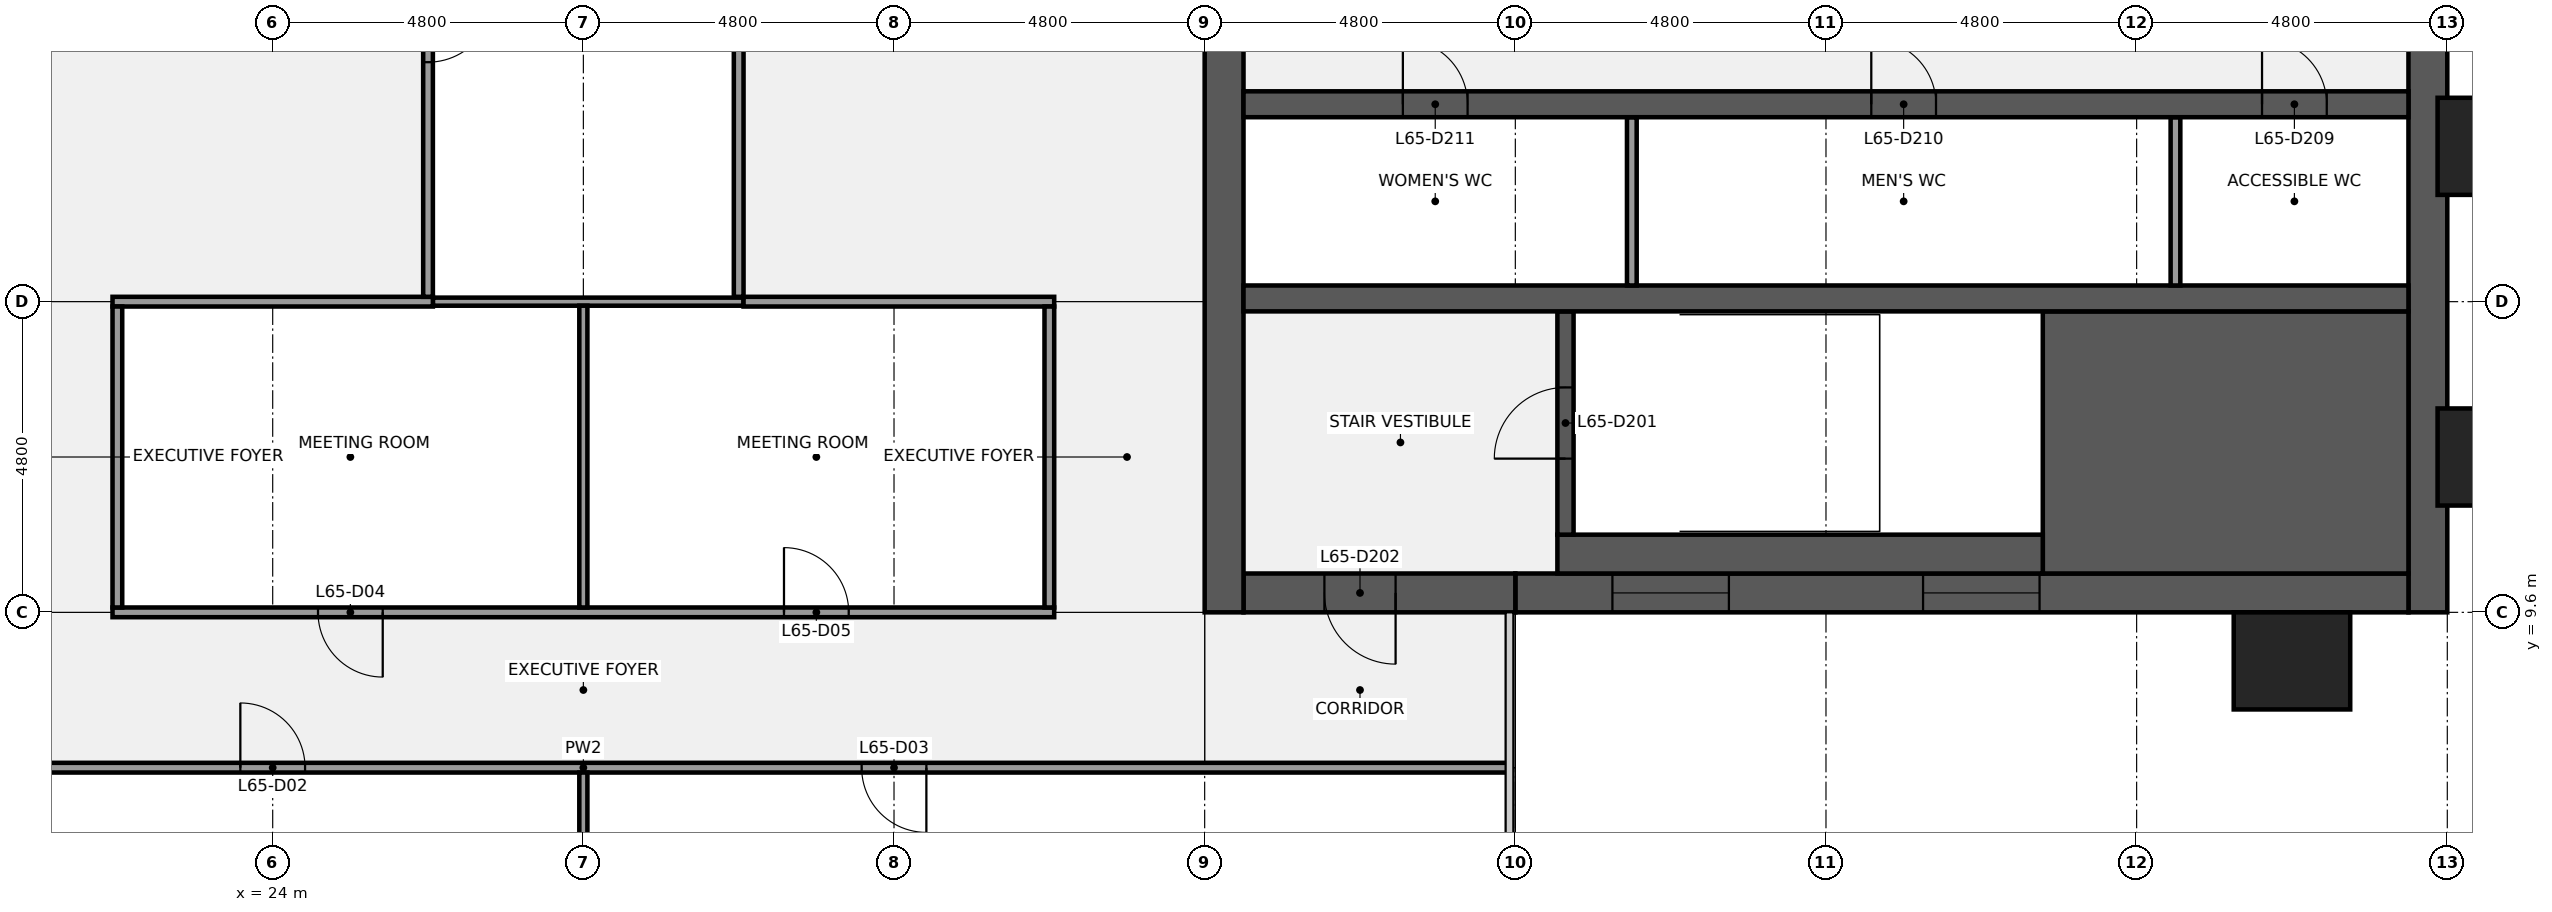
"""IFC4 building model, lengths in metres.
Left out: names, types, materials, properties, quantities, classifications, styles, units other than length and angle.
Written with IfcOpenShell. Run it as: python <this file> out.ifc"""

import sys

from ifc_helpers import new_model, si_unit, direction, frame, frame_2d, origin, origin_2d, place, context, subcontext, project, spatial, rectangle, extrude, element, fill, save


model = new_model("IFC4")
c1 = context("Model", 3, precision=1e-05, world=origin(), true_north=direction((0.0, 1.0)))
c2 = subcontext(c1, "Body", "Model", "MODEL_VIEW")
j1 = project(units=[si_unit("LENGTHUNIT", "METRE"), si_unit("PLANEANGLEUNIT", "RADIAN")], contexts=[c1])
p1 = place(None, origin())
s1 = spatial("IfcSite", under=j1, at=p1, CompositionType="ELEMENT")
p2 = place(p1, origin())
s2 = spatial("IfcBuilding", under=s1, at=p2, CompositionType="ELEMENT")
p3 = place(p2, frame((0.0, 0.0, 298.3)))
s3 = spatial("IfcBuildingStorey", under=s2, at=p3, CompositionType="ELEMENT", Elevation=298.3)
p4 = place(p3, frame((57.3, 38.4, 0.0), z_axis=(0.0, 0.0, 1.0), x_axis=(0.0, -1.0, 0.0)))
e1 = element("IfcWall", 1, at=p4, inside=s3, PredefinedType="SHEAR", context=c2, shape_type="SweptSolid", body=[
    extrude(rectangle(XDim=28.8, YDim=0.6, at=frame_2d((14.4, 0.0))), origin(), (0.0, 0.0, 1.0), 3.84),
])
p5 = place(p4, frame((18.45, 0.0, 0.9)))
e2 = element("IfcOpeningElement", 2, at=p5, cuts=e1, PredefinedType="OPENING", context=c2, shape_type="SweptSolid", body=[
    extrude(rectangle(XDim=1.5, YDim=1.5, at=frame_2d((0.75, 0.75))), frame((0.0, 0.31, 0.0), z_axis=(0.0, -1.0, 0.0), x_axis=(1.0, 0.0, 0.0)), (0.0, 0.0, 1.0), 0.62),
])
p6 = place(p4, frame((8.85, 0.0, 0.9)))
e3 = element("IfcOpeningElement", 3, at=p6, cuts=e1, PredefinedType="OPENING", context=c2, shape_type="SweptSolid", body=[
    extrude(rectangle(XDim=1.5, YDim=1.5, at=frame_2d((0.75, 0.75))), frame((0.0, 0.31, 0.0), z_axis=(0.0, -1.0, 0.0), x_axis=(1.0, 0.0, 0.0)), (0.0, 0.0, 1.0), 0.62),
])
p7 = place(p3, frame((57.0, 9.9, 0.0), z_axis=(0.0, 0.0, 1.0), x_axis=(-1.0, 0.0, 0.0)))
e4 = element("IfcWall", 4, at=p7, inside=s3, PredefinedType="SHEAR", context=c2, shape_type="SweptSolid", body=[
    extrude(rectangle(XDim=13.8, YDim=0.6, at=frame_2d((6.9, 0.0))), origin(), (0.0, 0.0, 1.0), 3.84),
])
p8 = place(p7, frame((5.7, 0.0, 0.9)))
e5 = element("IfcOpeningElement", 5, at=p8, cuts=e4, PredefinedType="OPENING", context=c2, shape_type="SweptSolid", body=[
    extrude(rectangle(XDim=1.8, YDim=1.5, at=frame_2d((0.9, 0.75))), frame((0.0, 0.31, 0.0), z_axis=(0.0, -1.0, 0.0), x_axis=(1.0, 0.0, 0.0)), (0.0, 0.0, 1.0), 0.62),
])
p9 = place(p7, frame((10.5, 0.0, 0.9)))
e6 = element("IfcOpeningElement", 6, at=p9, cuts=e4, PredefinedType="OPENING", context=c2, shape_type="SweptSolid", body=[
    extrude(rectangle(XDim=1.8, YDim=1.5, at=frame_2d((0.9, 0.75))), frame((0.0, 0.31, 0.0), z_axis=(0.0, -1.0, 0.0), x_axis=(1.0, 0.0, 0.0)), (0.0, 0.0, 1.0), 0.62),
])
p10 = place(p3, frame((43.2, 9.9, 0.0), z_axis=(0.0, 0.0, 1.0), x_axis=(-1.0, 0.0, 0.0)))
e7 = element("IfcWall", 7, at=p10, inside=s3, PredefinedType="SHEAR", context=c2, shape_type="SweptSolid", body=[
    extrude(rectangle(XDim=4.2, YDim=0.6, at=frame_2d((2.1, 0.0))), origin(), (0.0, 0.0, 1.0), 3.84),
])
p11 = place(p10, frame((1.85, 0.0, 0.0)))
e8 = element("IfcOpeningElement", 8, at=p11, cuts=e7, PredefinedType="OPENING", context=c2, shape_type="SweptSolid", body=[
    extrude(rectangle(XDim=1.1, YDim=2.1, at=frame_2d((0.55, 1.05))), frame((0.0, 0.31, 0.0), z_axis=(0.0, -1.0, 0.0), x_axis=(1.0, 0.0, 0.0)), (0.0, 0.0, 1.0), 0.62),
])
p12 = place(p3, frame((38.7, 9.6, 0.0), z_axis=(0.0, 0.0, 1.0), x_axis=(0.0, 1.0, 0.0)))
e9 = element("IfcWall", 9, at=p12, inside=s3, PredefinedType="SHEAR", context=c2, shape_type="SweptSolid", body=[
    extrude(rectangle(XDim=28.8, YDim=0.6, at=frame_2d((14.4, 0.0))), origin(), (0.0, 0.0, 1.0), 3.84),
])
p13 = place(p12, frame((8.7, 0.0, 0.0)))
e10 = element("IfcOpeningElement", 10, at=p13, cuts=e9, PredefinedType="OPENING", context=c2, shape_type="SweptSolid", body=[
    extrude(rectangle(XDim=1.8, YDim=2.1, at=frame_2d((0.9, 1.05))), frame((0.0, 0.31, 0.0), z_axis=(0.0, -1.0, 0.0), x_axis=(1.0, 0.0, 0.0)), (0.0, 0.0, 1.0), 0.62),
])
p14 = place(p12, frame((18.3, 0.0, 0.0)))
e11 = element("IfcOpeningElement", 11, at=p14, cuts=e9, PredefinedType="OPENING", context=c2, shape_type="SweptSolid", body=[
    extrude(rectangle(XDim=1.8, YDim=2.1, at=frame_2d((0.9, 1.05))), frame((0.0, 0.31, 0.0), z_axis=(0.0, -1.0, 0.0), x_axis=(1.0, 0.0, 0.0)), (0.0, 0.0, 1.0), 0.62),
])
p15 = place(p3, frame((51.35, 12.225, 0.0), z_axis=(0.0, 0.0, 1.0), x_axis=(1.0, 0.0, 0.0)))
e12 = element("IfcWall", 12, at=p15, inside=s3, PredefinedType="SHEAR", context=c2, shape_type="SweptSolid", body=[
    extrude(rectangle(XDim=5.65, YDim=4.05, at=frame_2d((2.825, 0.0))), origin(), (0.0, 0.0, 1.0), 3.84),
])
p16 = place(p3, frame((43.85, 10.5, 0.0), z_axis=(0.0, 0.0, 1.0), x_axis=(1.0, 0.0, 0.0)))
e13 = element("IfcWall", 13, at=p16, inside=s3, PredefinedType="SHEAR", context=c2, shape_type="SweptSolid", body=[
    extrude(rectangle(XDim=7.5, YDim=0.6, at=frame_2d((3.75, 0.0))), origin(), (0.0, 0.0, 1.0), 3.84),
])
p17 = place(p3, frame((43.975, 10.8, 0.0), z_axis=(0.0, 0.0, 1.0), x_axis=(0.0, 1.0, 0.0)))
e14 = element("IfcWall", 14, at=p17, inside=s3, PredefinedType="SHEAR", context=c2, shape_type="SweptSolid", body=[
    extrude(rectangle(XDim=3.45, YDim=0.25, at=frame_2d((1.725, 0.0))), origin(), (0.0, 0.0, 1.0), 3.84),
])
p18 = place(p17, frame((1.175, 0.0, 0.0)))
e15 = element("IfcOpeningElement", 15, at=p18, cuts=e14, PredefinedType="OPENING", context=c2, shape_type="SweptSolid", body=[
    extrude(rectangle(XDim=1.1, YDim=2.1, at=frame_2d((0.55, 1.05))), frame((0.0, 0.135, 0.0), z_axis=(0.0, -1.0, 0.0), x_axis=(1.0, 0.0, 0.0)), (0.0, 0.0, 1.0), 0.27),
])
p19 = place(p3, frame((39.0, 14.45, 0.0), z_axis=(0.0, 0.0, 1.0), x_axis=(1.0, 0.0, 0.0)))
e16 = element("IfcWall", 16, at=p19, inside=s3, PredefinedType="SHEAR", context=c2, shape_type="SweptSolid", body=[
    extrude(rectangle(XDim=18.0, YDim=0.4, at=frame_2d((9.0, 0.0))), origin(), (0.0, 0.0, 1.0), 3.84),
])
for number, where, z_axis, x_axis in (
    (17, (53.4, 14.65, 0.0), (0.0, 0.0, 1.0), (0.0, 1.0, 0.0)),
    (18, (45.0, 14.65, 0.0), (0.0, 0.0, 1.0), (0.0, 1.0, 0.0)),
):
    element("IfcWall", number, at=place(p3, frame(where, z_axis=z_axis, x_axis=x_axis)), inside=s3, PredefinedType="PARTITIONING", context=c2, shape_type="SweptSolid", body=[
        extrude(rectangle(XDim=2.6, YDim=0.15, at=frame_2d((1.3, 0.0))), origin(), (0.0, 0.0, 1.0), 3.84),
    ])
p20 = place(p3, frame((39.0, 17.45, 0.0), z_axis=(0.0, 0.0, 1.0), x_axis=(1.0, 0.0, 0.0)))
e19 = element("IfcWall", 19, at=p20, inside=s3, PredefinedType="SHEAR", context=c2, shape_type="SweptSolid", body=[
    extrude(rectangle(XDim=18.0, YDim=0.4, at=frame_2d((9.0, 0.0))), origin(), (0.0, 0.0, 1.0), 3.84),
])
p21 = place(p20, frame((15.738, 0.0, 0.0)))
e20 = element("IfcOpeningElement", 20, at=p21, cuts=e19, PredefinedType="OPENING", context=c2, shape_type="SweptSolid", body=[
    extrude(rectangle(XDim=1.0, YDim=2.1, at=frame_2d((0.5, 1.05))), frame((0.0, 0.21, 0.0), z_axis=(0.0, -1.0, 0.0), x_axis=(1.0, 0.0, 0.0)), (0.0, 0.0, 1.0), 0.42),
])
p22 = place(p20, frame((9.7, 0.0, 0.0)))
e21 = element("IfcOpeningElement", 21, at=p22, cuts=e19, PredefinedType="OPENING", context=c2, shape_type="SweptSolid", body=[
    extrude(rectangle(XDim=1.0, YDim=2.1, at=frame_2d((0.5, 1.05))), frame((0.0, 0.21, 0.0), z_axis=(0.0, -1.0, 0.0), x_axis=(1.0, 0.0, 0.0)), (0.0, 0.0, 1.0), 0.42),
])
p23 = place(p20, frame((2.462, 0.0, 0.0)))
e22 = element("IfcOpeningElement", 22, at=p23, cuts=e19, PredefinedType="OPENING", context=c2, shape_type="SweptSolid", body=[
    extrude(rectangle(XDim=1.0, YDim=2.1, at=frame_2d((0.5, 1.05))), frame((0.0, 0.21, 0.0), z_axis=(0.0, -1.0, 0.0), x_axis=(1.0, 0.0, 0.0)), (0.0, 0.0, 1.0), 0.42),
])
p24 = place(p3, frame((14.5, 7.2, 0.0), z_axis=(0.0, 0.0, 1.0), x_axis=(1.0, 0.0, 0.0)))
e23 = element("IfcWall", 23, at=p24, inside=s3, PredefinedType="PARTITIONING", context=c2, shape_type="SweptSolid", body=[
    extrude(rectangle(XDim=28.6, YDim=0.15, at=frame_2d((14.3, 0.0))), origin(), (0.0, 0.0, 1.0), 2.849),
])
p25 = place(p24, frame((1.85, 0.0, 0.0)))
e24 = element("IfcOpeningElement", 24, at=p25, cuts=e23, PredefinedType="OPENING", context=c2, shape_type="SweptSolid", body=[
    extrude(rectangle(XDim=1.0, YDim=2.1, at=frame_2d((0.5, 1.05))), frame((0.0, 0.085, 0.0), z_axis=(0.0, -1.0, 0.0), x_axis=(1.0, 0.0, 0.0)), (0.0, 0.0, 1.0), 0.17),
])
p26 = place(p24, frame((9.0, 0.0, 0.0)))
e25 = element("IfcOpeningElement", 25, at=p26, cuts=e23, PredefinedType="OPENING", context=c2, shape_type="SweptSolid", body=[
    extrude(rectangle(XDim=1.0, YDim=2.1, at=frame_2d((0.5, 1.05))), frame((0.0, 0.085, 0.0), z_axis=(0.0, -1.0, 0.0), x_axis=(1.0, 0.0, 0.0)), (0.0, 0.0, 1.0), 0.17),
])
p27 = place(p24, frame((18.6, 0.0, 0.0)))
e26 = element("IfcOpeningElement", 26, at=p27, cuts=e23, PredefinedType="OPENING", context=c2, shape_type="SweptSolid", body=[
    extrude(rectangle(XDim=1.0, YDim=2.1, at=frame_2d((0.5, 1.05))), frame((0.0, 0.085, 0.0), z_axis=(0.0, -1.0, 0.0), x_axis=(1.0, 0.0, 0.0)), (0.0, 0.0, 1.0), 0.17),
])
p28 = place(p3, frame((21.525, 9.6, 0.0), z_axis=(0.0, 0.0, 1.0), x_axis=(1.0, 0.0, 0.0)))
e27 = element("IfcWall", 27, at=p28, inside=s3, PredefinedType="PARTITIONING", context=c2, shape_type="SweptSolid", body=[
    extrude(rectangle(XDim=14.55, YDim=0.15, at=frame_2d((7.275, 0.0))), origin(), (0.0, 0.0, 1.0), 2.849),
])
p29 = place(p28, frame((3.175, 0.0, 0.0)))
e28 = element("IfcOpeningElement", 28, at=p29, cuts=e27, PredefinedType="OPENING", context=c2, shape_type="SweptSolid", body=[
    extrude(rectangle(XDim=1.0, YDim=2.1, at=frame_2d((0.5, 1.05))), frame((0.0, 0.085, 0.0), z_axis=(0.0, -1.0, 0.0), x_axis=(1.0, 0.0, 0.0)), (0.0, 0.0, 1.0), 0.17),
])
p30 = place(p28, frame((10.375, 0.0, 0.0)))
e29 = element("IfcOpeningElement", 29, at=p30, cuts=e27, PredefinedType="OPENING", context=c2, shape_type="SweptSolid", body=[
    extrude(rectangle(XDim=1.0, YDim=2.1, at=frame_2d((0.5, 1.05))), frame((0.0, 0.085, 0.0), z_axis=(0.0, -1.0, 0.0), x_axis=(1.0, 0.0, 0.0)), (0.0, 0.0, 1.0), 0.17),
])
p31 = place(p3, frame((26.475, 14.4, 0.0), z_axis=(0.0, 0.0, 1.0), x_axis=(1.0, 0.0, 0.0)))
e30 = element("IfcWall", 30, at=p31, inside=s3, PredefinedType="PARTITIONING", context=c2, shape_type="SweptSolid", body=[
    extrude(rectangle(XDim=4.8, YDim=0.125, at=frame_2d((2.4, 0.0))), origin(), (0.0, 0.0, 1.0), 2.849),
])
p32 = place(p3, frame((21.525, 14.4, 0.0), z_axis=(0.0, 0.0, 1.0), x_axis=(1.0, 0.0, 0.0)))
e31 = element("IfcWall", 31, at=p32, inside=s3, PredefinedType="PARTITIONING", context=c2, shape_type="SweptSolid", body=[
    extrude(rectangle(XDim=4.95, YDim=0.15, at=frame_2d((2.475, 0.0))), origin(), (0.0, 0.0, 1.0), 2.849),
])
p33 = place(p3, frame((31.275, 14.4, 0.0), z_axis=(0.0, 0.0, 1.0), x_axis=(1.0, 0.0, 0.0)))
e32 = element("IfcWall", 32, at=p33, inside=s3, PredefinedType="PARTITIONING", context=c2, shape_type="SweptSolid", body=[
    extrude(rectangle(XDim=4.8, YDim=0.15, at=frame_2d((2.4, 0.0))), origin(), (0.0, 0.0, 1.0), 2.849),
])
p34 = place(p3, frame((21.6, 9.675, 0.0), z_axis=(0.0, 0.0, 1.0), x_axis=(0.0, 1.0, 0.0)))
e33 = element("IfcWall", 33, at=p34, inside=s3, PredefinedType="PARTITIONING", context=c2, shape_type="SweptSolid", body=[
    extrude(rectangle(XDim=4.65, YDim=0.15, at=frame_2d((2.325, 0.0))), origin(), (0.0, 0.0, 1.0), 2.849),
])
p35 = place(p3, frame((26.4, 14.475, 0.0), z_axis=(0.0, 0.0, 1.0), x_axis=(0.0, 1.0, 0.0)))
e34 = element("IfcWall", 34, at=p35, inside=s3, PredefinedType="PARTITIONING", context=c2, shape_type="SweptSolid", body=[
    extrude(rectangle(XDim=8.25, YDim=0.15, at=frame_2d((4.125, 0.0))), origin(), (0.0, 0.0, 1.0), 2.849),
])
p36 = place(p35, frame((3.625, 0.0, 0.0)))
e35 = element("IfcOpeningElement", 35, at=p36, cuts=e34, PredefinedType="OPENING", context=c2, shape_type="SweptSolid", body=[
    extrude(rectangle(XDim=1.0, YDim=2.1, at=frame_2d((0.5, 1.05))), frame((0.0, 0.085, 0.0), z_axis=(0.0, -1.0, 0.0), x_axis=(1.0, 0.0, 0.0)), (0.0, 0.0, 1.0), 0.17),
])
p37 = place(p3, frame((28.8, 0.5, 0.0), z_axis=(0.0, 0.0, 1.0), x_axis=(0.0, 1.0, 0.0)))
e36 = element("IfcWall", 36, at=p37, inside=s3, PredefinedType="PARTITIONING", context=c2, shape_type="SweptSolid", body=[
    extrude(rectangle(XDim=6.625, YDim=0.125, at=frame_2d((3.312, 0.0))), origin(), (0.0, 0.0, 1.0), 2.849),
])
p38 = place(p3, frame((28.8, 9.675, 0.0), z_axis=(0.0, 0.0, 1.0), x_axis=(0.0, 1.0, 0.0)))
e37 = element("IfcWall", 37, at=p38, inside=s3, PredefinedType="PARTITIONING", context=c2, shape_type="SweptSolid", body=[
    extrude(rectangle(XDim=4.662, YDim=0.125, at=frame_2d((2.331, 0.0))), origin(), (0.0, 0.0, 1.0), 2.849),
])
p39 = place(p3, frame((31.2, 14.475, 0.0), z_axis=(0.0, 0.0, 1.0), x_axis=(0.0, 1.0, 0.0)))
e38 = element("IfcWall", 38, at=p39, inside=s3, PredefinedType="PARTITIONING", context=c2, shape_type="SweptSolid", body=[
    extrude(rectangle(XDim=8.25, YDim=0.15, at=frame_2d((4.125, 0.0))), origin(), (0.0, 0.0, 1.0), 2.849),
])
p40 = place(p3, frame((36.0, 9.675, 0.0), z_axis=(0.0, 0.0, 1.0), x_axis=(0.0, 1.0, 0.0)))
e39 = element("IfcWall", 39, at=p40, inside=s3, PredefinedType="PARTITIONING", context=c2, shape_type="SweptSolid", body=[
    extrude(rectangle(XDim=4.65, YDim=0.15, at=frame_2d((2.325, 0.0))), origin(), (0.0, 0.0, 1.0), 2.849),
])
for number, where, z_axis, x_axis in (
    (40, (55.2, 8.85, 0.0), (0.0, 0.0, 1.0), (1.0, 0.0, 0.0)),
    (41, (58.35, 12.0, 0.0), (0.0, 0.0, 1.0), (0.0, 1.0, 0.0)),
    (42, (58.35, 16.8, 0.0), (0.0, 0.0, 1.0), (0.0, 1.0, 0.0)),
):
    element("IfcColumn", number, at=place(p3, frame(where, z_axis=z_axis, x_axis=x_axis)), inside=s3, PredefinedType="PILASTER", context=c2, shape_type="SweptSolid", body=[
        extrude(rectangle(XDim=1.8, YDim=1.5, at=origin_2d()), origin(), (0.0, 0.0, 1.0), 4.0),
    ])
p41 = place(p18, origin())
e43 = element("IfcDoor", 43, at=p41, inside=s3, OperationType="SINGLE_SWING_LEFT", PredefinedType="DOOR", context=c2, shape_type="SweptSolid", body=[
    extrude(rectangle(XDim=1.1, YDim=2.1, at=frame_2d((0.55, 1.05))), frame((0.0, 0.025, 0.0), z_axis=(0.0, -1.0, 0.0), x_axis=(1.0, 0.0, 0.0)), (0.0, 0.0, 1.0), 0.05),
])
fill(e15, e43)
p42 = place(p11, origin())
e44 = element("IfcDoor", 44, at=p42, inside=s3, OperationType="SINGLE_SWING_LEFT", PredefinedType="DOOR", context=c2, shape_type="SweptSolid", body=[
    extrude(rectangle(XDim=1.1, YDim=2.1, at=frame_2d((0.55, 1.05))), frame((0.0, 0.025, 0.0), z_axis=(0.0, -1.0, 0.0), x_axis=(1.0, 0.0, 0.0)), (0.0, 0.0, 1.0), 0.05),
])
fill(e8, e44)
p43 = place(p21, origin())
e45 = element("IfcDoor", 45, at=p43, inside=s3, OperationType="SINGLE_SWING_LEFT", PredefinedType="DOOR", context=c2, shape_type="SweptSolid", body=[
    extrude(rectangle(XDim=1.0, YDim=2.1, at=frame_2d((0.5, 1.05))), frame((0.0, 0.025, 0.0), z_axis=(0.0, -1.0, 0.0), x_axis=(1.0, 0.0, 0.0)), (0.0, 0.0, 1.0), 0.05),
])
fill(e20, e45)
p44 = place(p22, origin())
e46 = element("IfcDoor", 46, at=p44, inside=s3, OperationType="SINGLE_SWING_LEFT", PredefinedType="DOOR", context=c2, shape_type="SweptSolid", body=[
    extrude(rectangle(XDim=1.0, YDim=2.1, at=frame_2d((0.5, 1.05))), frame((0.0, 0.025, 0.0), z_axis=(0.0, -1.0, 0.0), x_axis=(1.0, 0.0, 0.0)), (0.0, 0.0, 1.0), 0.05),
])
fill(e21, e46)
p45 = place(p23, origin())
e47 = element("IfcDoor", 47, at=p45, inside=s3, OperationType="SINGLE_SWING_LEFT", PredefinedType="DOOR", context=c2, shape_type="SweptSolid", body=[
    extrude(rectangle(XDim=1.0, YDim=2.1, at=frame_2d((0.5, 1.05))), frame((0.0, 0.025, 0.0), z_axis=(0.0, -1.0, 0.0), x_axis=(1.0, 0.0, 0.0)), (0.0, 0.0, 1.0), 0.05),
])
fill(e22, e47)
p46 = place(p8, origin())
e48 = element("IfcWindow", 48, at=p46, inside=s3, PartitioningType="SINGLE_PANEL", PredefinedType="WINDOW", context=c2, shape_type="SweptSolid", body=[
    extrude(rectangle(XDim=1.8, YDim=1.5, at=frame_2d((0.9, 0.75))), frame((0.0, 0.03, 0.0), z_axis=(0.0, -1.0, 0.0), x_axis=(1.0, 0.0, 0.0)), (0.0, 0.0, 1.0), 0.06),
])
fill(e5, e48)
p47 = place(p9, origin())
e49 = element("IfcWindow", 49, at=p47, inside=s3, PartitioningType="SINGLE_PANEL", PredefinedType="WINDOW", context=c2, shape_type="SweptSolid", body=[
    extrude(rectangle(XDim=1.8, YDim=1.5, at=frame_2d((0.9, 0.75))), frame((0.0, 0.03, 0.0), z_axis=(0.0, -1.0, 0.0), x_axis=(1.0, 0.0, 0.0)), (0.0, 0.0, 1.0), 0.06),
])
fill(e6, e49)
p48 = place(p26, origin())
e50 = element("IfcDoor", 50, at=p48, inside=s3, OperationType="SINGLE_SWING_LEFT", PredefinedType="DOOR", context=c2, shape_type="SweptSolid", body=[
    extrude(rectangle(XDim=1.0, YDim=2.1, at=frame_2d((0.5, 1.05))), frame((0.0, 0.025, 0.0), z_axis=(0.0, -1.0, 0.0), x_axis=(1.0, 0.0, 0.0)), (0.0, 0.0, 1.0), 0.05),
])
fill(e25, e50)
p49 = place(p27, origin())
e51 = element("IfcDoor", 51, at=p49, inside=s3, OperationType="SINGLE_SWING_RIGHT", PredefinedType="DOOR", context=c2, shape_type="SweptSolid", body=[
    extrude(rectangle(XDim=1.0, YDim=2.1, at=frame_2d((0.5, 1.05))), frame((0.0, 0.025, 0.0), z_axis=(0.0, -1.0, 0.0), x_axis=(1.0, 0.0, 0.0)), (0.0, 0.0, 1.0), 0.05),
])
fill(e26, e51)
p50 = place(p29, origin())
e52 = element("IfcDoor", 52, at=p50, inside=s3, OperationType="SINGLE_SWING_RIGHT", PredefinedType="DOOR", context=c2, shape_type="SweptSolid", body=[
    extrude(rectangle(XDim=1.0, YDim=2.1, at=frame_2d((0.5, 1.05))), frame((0.0, 0.025, 0.0), z_axis=(0.0, -1.0, 0.0), x_axis=(1.0, 0.0, 0.0)), (0.0, 0.0, 1.0), 0.05),
])
fill(e28, e52)
p51 = place(p30, origin())
e53 = element("IfcDoor", 53, at=p51, inside=s3, OperationType="SINGLE_SWING_LEFT", PredefinedType="DOOR", context=c2, shape_type="SweptSolid", body=[
    extrude(rectangle(XDim=1.0, YDim=2.1, at=frame_2d((0.5, 1.05))), frame((0.0, 0.025, 0.0), z_axis=(0.0, -1.0, 0.0), x_axis=(1.0, 0.0, 0.0)), (0.0, 0.0, 1.0), 0.05),
])
fill(e29, e53)
p52 = place(p36, origin())
e54 = element("IfcDoor", 54, at=p52, inside=s3, OperationType="SINGLE_SWING_RIGHT", PredefinedType="DOOR", context=c2, shape_type="SweptSolid", body=[
    extrude(rectangle(XDim=1.0, YDim=2.1, at=frame_2d((0.5, 1.05))), frame((0.0, 0.025, 0.0), z_axis=(0.0, -1.0, 0.0), x_axis=(1.0, 0.0, 0.0)), (0.0, 0.0, 1.0), 0.05),
])
fill(e35, e54)
save(model, sys.argv[1])
